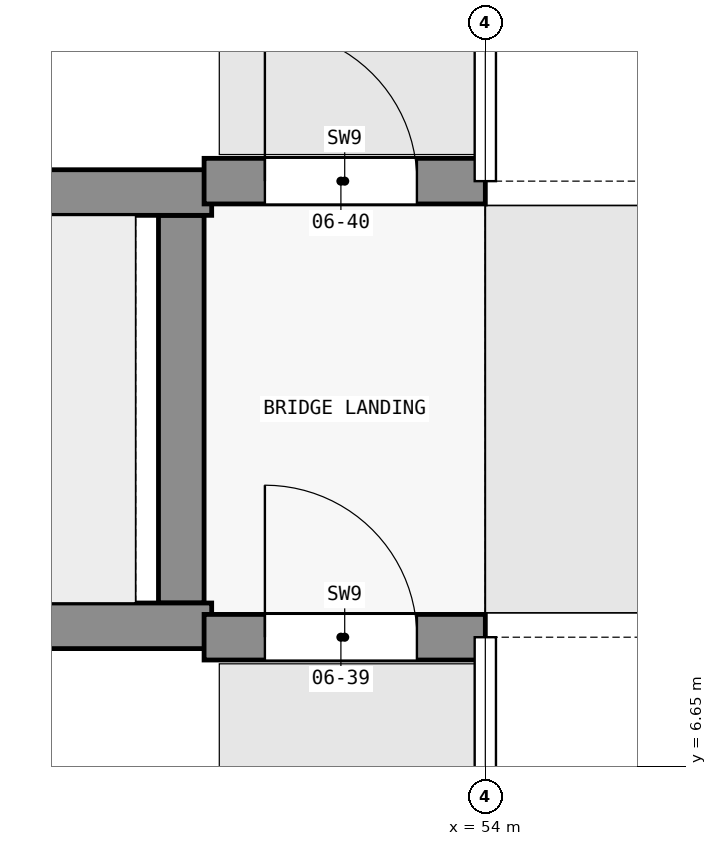
"""IFC4 building model, lengths in metres.
Left out: names, types, materials, properties, quantities, classifications, styles, units other than length and angle.
Written with IfcOpenShell. Run it as: python <this file> out.ifc"""

import sys

from ifc_helpers import new_model, si_unit, direction, frame, frame_2d, origin, place, context, subcontext, project, spatial, rectangle, extrude, element, fill, save


model = new_model("IFC4")
c1 = context("Model", 3, precision=1e-05, world=origin(), true_north=direction((0.0, 1.0)))
c2 = subcontext(c1, "Body", "Model", "MODEL_VIEW")
j1 = project(units=[si_unit("LENGTHUNIT", "METRE"), si_unit("PLANEANGLEUNIT", "RADIAN")], contexts=[c1])
p1 = place(None, origin())
s1 = spatial("IfcSite", under=j1, at=p1, CompositionType="ELEMENT")
p2 = place(p1, origin())
s2 = spatial("IfcBuilding", under=s1, at=p2, CompositionType="ELEMENT")
p3 = place(p2, frame((0.0, 0.0, 30.3)))
s3 = spatial("IfcBuildingStorey", under=s2, at=p3, CompositionType="ELEMENT", Elevation=30.3)
p4 = place(p3, frame((52.0, 7.725, 0.0), z_axis=(0.0, 0.0, 1.0), x_axis=(0.0, 1.0, 0.0)))
e1 = element("IfcWall", 1, at=p4, inside=s3, PredefinedType="SHEAR", context=c2, shape_type="SweptSolid", body=[
    extrude(rectangle(XDim=2.55, YDim=0.3, at=frame_2d((1.275, 0.0))), origin(), (0.0, 0.0, 1.0), 3.5),
])
for number, where, z_axis, x_axis in (
    (2, (45.0, 7.575, 0.0), (0.0, 0.0, 1.0), (1.0, 0.0, 0.0)),
    (3, (45.0, 10.425, 0.0), (0.0, 0.0, 1.0), (1.0, 0.0, 0.0)),
):
    element("IfcWall", number, at=place(p3, frame(where, z_axis=z_axis, x_axis=x_axis)), inside=s3, PredefinedType="SHEAR", context=c2, shape_type="SweptSolid", body=[
        extrude(rectangle(XDim=7.2, YDim=0.3, at=frame_2d((3.6, 0.0))), origin(), (0.0, 0.0, 1.0), 3.5),
    ])
p5 = place(p3, frame((52.15, 7.5, 0.0), z_axis=(0.0, 0.0, 1.0), x_axis=(1.0, 0.0, 0.0)))
e4 = element("IfcWall", 4, at=p5, inside=s3, PredefinedType="SHEAR", context=c2, shape_type="SweptSolid", body=[
    extrude(rectangle(XDim=1.85, YDim=0.3, at=frame_2d((0.925, 0.0))), origin(), (0.0, 0.0, 1.0), 3.25),
])
p6 = place(p5, frame((0.4, 0.0, 0.0)))
e5 = element("IfcOpeningElement", 5, at=p6, cuts=e4, PredefinedType="OPENING", context=c2, shape_type="SweptSolid", body=[
    extrude(rectangle(XDim=1.0, YDim=2.1, at=frame_2d((0.5, 1.05))), frame((0.0, 0.16, 0.0), z_axis=(0.0, -1.0, 0.0), x_axis=(1.0, 0.0, 0.0)), (0.0, 0.0, 1.0), 0.32),
])
p7 = place(p3, frame((52.15, 10.5, 0.0), z_axis=(0.0, 0.0, 1.0), x_axis=(1.0, 0.0, 0.0)))
e6 = element("IfcWall", 6, at=p7, inside=s3, PredefinedType="SHEAR", context=c2, shape_type="SweptSolid", body=[
    extrude(rectangle(XDim=1.85, YDim=0.3, at=frame_2d((0.925, 0.0))), origin(), (0.0, 0.0, 1.0), 3.25),
])
p8 = place(p7, frame((0.4, 0.0, 0.0)))
e7 = element("IfcOpeningElement", 7, at=p8, cuts=e6, PredefinedType="OPENING", context=c2, shape_type="SweptSolid", body=[
    extrude(rectangle(XDim=1.0, YDim=2.1, at=frame_2d((0.5, 1.05))), frame((0.0, 0.16, 0.0), z_axis=(0.0, -1.0, 0.0), x_axis=(1.0, 0.0, 0.0)), (0.0, 0.0, 1.0), 0.32),
])
p9 = place(p6, origin())
e8 = element("IfcDoor", 8, at=p9, inside=s3, OperationType="SINGLE_SWING_LEFT", PredefinedType="DOOR", context=c2, shape_type="SweptSolid", body=[
    extrude(rectangle(XDim=1.0, YDim=2.1, at=frame_2d((0.5, 1.05))), frame((0.0, 0.025, 0.0), z_axis=(0.0, -1.0, 0.0), x_axis=(1.0, 0.0, 0.0)), (0.0, 0.0, 1.0), 0.05),
])
fill(e5, e8)
p10 = place(p8, origin())
e9 = element("IfcDoor", 9, at=p10, inside=s3, OperationType="SINGLE_SWING_LEFT", PredefinedType="DOOR", context=c2, shape_type="SweptSolid", body=[
    extrude(rectangle(XDim=1.0, YDim=2.1, at=frame_2d((0.5, 1.05))), frame((0.0, 0.025, 0.0), z_axis=(0.0, -1.0, 0.0), x_axis=(1.0, 0.0, 0.0)), (0.0, 0.0, 1.0), 0.05),
])
fill(e7, e9)
save(model, sys.argv[1])
